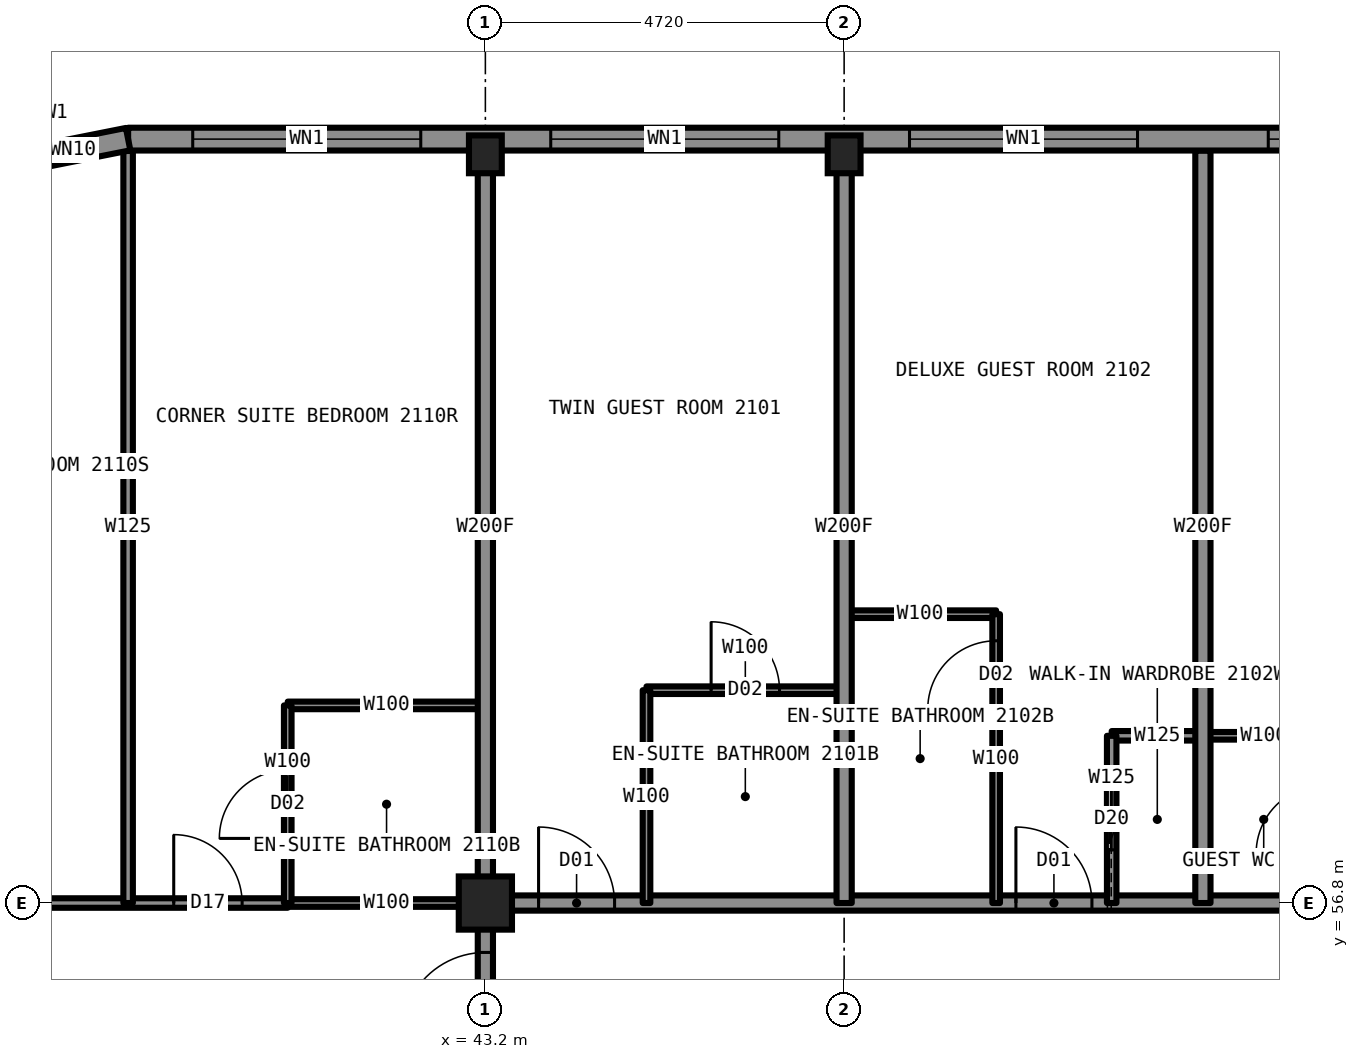
"""IFC4 building model, lengths in metres.
Left out: names, types, materials, properties, quantities, classifications, styles, units other than length and angle.
Written with IfcOpenShell. Run it as: python <this file> out.ifc"""

import sys

from ifc_helpers import new_model, si_unit, direction, frame, frame_2d, origin, origin_2d, place, context, subcontext, project, spatial, rectangle, hollow_rectangle, i_section, extrude, element, fill, save


model = new_model("IFC4")
c1 = context("Model", 3, precision=1e-05, world=origin(), true_north=direction((0.0, 1.0)))
c2 = subcontext(c1, "Body", "Model", "MODEL_VIEW")
j1 = project(units=[si_unit("LENGTHUNIT", "METRE"), si_unit("PLANEANGLEUNIT", "RADIAN")], contexts=[c1])
p1 = place(None, origin())
s1 = spatial("IfcSite", under=j1, at=p1, CompositionType="ELEMENT")
p2 = place(p1, origin())
s2 = spatial("IfcBuilding", under=s1, at=p2, CompositionType="ELEMENT")
p3 = place(p2, frame((0.0, 0.0, 81.0)))
s3 = spatial("IfcBuildingStorey", under=s2, at=p3, CompositionType="ELEMENT", Elevation=81.0)
for number, where, z_axis, x_axis in (
    (1, (43.2, 66.65, 0.0), (0.0, 0.0, 1.0), (1.0, 0.0, 0.0)),
    (2, (47.92, 66.65, 0.0), (0.0, 0.0, 1.0), (1.0, 0.0, 0.0)),
):
    element("IfcColumn", number, at=place(p3, frame(where, z_axis=z_axis, x_axis=x_axis)), inside=s3, PredefinedType="COLUMN", context=c2, shape_type="SweptSolid", body=[
        extrude(i_section(OverallWidth=0.432, OverallDepth=0.498, WebThickness=0.056, FlangeThickness=0.089, at=origin_2d()), origin(), (0.0, 0.0, 1.0), 3.5),
    ])
p4 = place(p3, frame((43.2, 56.8, 0.0), z_axis=(0.0, 0.0, 1.0), x_axis=(1.0, 0.0, 0.0)))
e3 = element("IfcColumn", 3, at=p4, inside=s3, PredefinedType="COLUMN", context=c2, shape_type="SweptSolid", body=[
    extrude(hollow_rectangle(XDim=0.7, YDim=0.7, WallThickness=0.06, at=origin_2d()), origin(), (0.0, 0.0, 1.0), 3.5),
])
p5 = place(p3, frame((40.6, 56.8, 0.0), z_axis=(0.0, 0.0, 1.0), x_axis=(1.0, 0.0, 0.0)))
e4 = element("IfcWall", 4, at=p5, inside=s3, PredefinedType="PARTITIONING", context=c2, shape_type="SweptSolid", body=[
    extrude(rectangle(XDim=2.6, YDim=0.1, at=frame_2d((1.3, 0.0))), origin(), (0.0, 0.0, 1.0), 2.573),
])
p6 = place(p3, frame((43.2, 56.8, 0.0), z_axis=(0.0, 0.0, 1.0), x_axis=(1.0, 0.0, 0.0)))
e5 = element("IfcWall", 5, at=p6, inside=s3, PredefinedType="PARTITIONING", context=c2, shape_type="SweptSolid", body=[
    extrude(rectangle(XDim=23.6, YDim=0.2, at=frame_2d((11.8, 0.0))), origin(), (0.0, 0.0, 1.0), 3.33),
])
p7 = place(p6, frame((0.7, 0.0, 0.0)))
e6 = element("IfcOpeningElement", 6, at=p7, cuts=e5, PredefinedType="OPENING", context=c2, shape_type="SweptSolid", body=[
    extrude(rectangle(XDim=1.0, YDim=2.2, at=frame_2d((0.5, 1.1))), frame((0.0, 0.11, 0.0), z_axis=(0.0, -1.0, 0.0), x_axis=(1.0, 0.0, 0.0)), (0.0, 0.0, 1.0), 0.22),
])
p8 = place(p6, frame((6.98, 0.0, 0.0)))
e7 = element("IfcOpeningElement", 7, at=p8, cuts=e5, PredefinedType="OPENING", context=c2, shape_type="SweptSolid", body=[
    extrude(rectangle(XDim=1.0, YDim=2.2, at=frame_2d((0.5, 1.1))), frame((0.0, 0.11, 0.0), z_axis=(0.0, -1.0, 0.0), x_axis=(1.0, 0.0, 0.0)), (0.0, 0.0, 1.0), 0.22),
])
p9 = place(p6, frame((11.29, 0.0, 0.0)))
e8 = element("IfcOpeningElement", 8, at=p9, cuts=e5, PredefinedType="OPENING", context=c2, shape_type="SweptSolid", body=[
    extrude(rectangle(XDim=1.1, YDim=2.2, at=frame_2d((0.55, 1.1))), frame((0.0, 0.11, 0.0), z_axis=(0.0, -1.0, 0.0), x_axis=(1.0, 0.0, 0.0)), (0.0, 0.0, 1.0), 0.22),
])
p10 = place(p3, frame((33.3, 56.8, 0.0), z_axis=(0.0, 0.0, 1.0), x_axis=(1.0, 0.0, 0.0)))
e9 = element("IfcWall", 9, at=p10, inside=s3, PredefinedType="PARTITIONING", context=c2, shape_type="SweptSolid", body=[
    extrude(rectangle(XDim=7.3, YDim=0.125, at=frame_2d((3.65, 0.0))), origin(), (0.0, 0.0, 1.0), 2.573),
])
p11 = place(p10, frame((5.8, 0.0, 0.0)))
e10 = element("IfcOpeningElement", 10, at=p11, cuts=e9, PredefinedType="OPENING", context=c2, shape_type="SweptSolid", body=[
    extrude(rectangle(XDim=0.9, YDim=2.2, at=frame_2d((0.45, 1.1))), frame((0.0, 0.073, 0.0), z_axis=(0.0, -1.0, 0.0), x_axis=(1.0, 0.0, 0.0)), (0.0, 0.0, 1.0), 0.145),
])
p12 = place(p10, frame((2.0, 0.0, 0.0)))
e11 = element("IfcOpeningElement", 11, at=p12, cuts=e9, PredefinedType="OPENING", context=c2, shape_type="SweptSolid", body=[
    extrude(rectangle(XDim=0.9, YDim=2.2, at=frame_2d((0.45, 1.1))), frame((0.0, 0.073, 0.0), z_axis=(0.0, -1.0, 0.0), x_axis=(1.0, 0.0, 0.0)), (0.0, 0.0, 1.0), 0.145),
])
p13 = place(p3, frame((52.64, 59.0, 0.0), z_axis=(0.0, 0.0, 1.0), x_axis=(1.0, 0.0, 0.0)))
e12 = element("IfcWall", 12, at=p13, inside=s3, PredefinedType="PARTITIONING", context=c2, shape_type="SweptSolid", body=[
    extrude(rectangle(XDim=1.6, YDim=0.1, at=frame_2d((0.8, 0.0))), origin(), (0.0, 0.0, 1.0), 3.33),
])
p14 = place(p3, frame((51.44, 59.0, 0.0), z_axis=(0.0, 0.0, 1.0), x_axis=(1.0, 0.0, 0.0)))
e13 = element("IfcWall", 13, at=p14, inside=s3, PredefinedType="PARTITIONING", context=c2, shape_type="SweptSolid", body=[
    extrude(rectangle(XDim=1.2, YDim=0.125, at=frame_2d((0.6, 0.0))), origin(), (0.0, 0.0, 1.0), 3.33),
])
p15 = place(p3, frame((40.6, 59.4, 0.0), z_axis=(0.0, 0.0, 1.0), x_axis=(1.0, 0.0, 0.0)))
e14 = element("IfcWall", 14, at=p15, inside=s3, PredefinedType="PARTITIONING", context=c2, shape_type="SweptSolid", body=[
    extrude(rectangle(XDim=2.6, YDim=0.1, at=frame_2d((1.3, 0.0))), origin(), (0.0, 0.0, 1.0), 3.33),
])
p16 = place(p3, frame((45.32, 59.6, 0.0), z_axis=(0.0, 0.0, 1.0), x_axis=(1.0, 0.0, 0.0)))
e15 = element("IfcWall", 15, at=p16, inside=s3, PredefinedType="PARTITIONING", context=c2, shape_type="SweptSolid", body=[
    extrude(rectangle(XDim=2.6, YDim=0.1, at=frame_2d((1.3, 0.0))), origin(), (0.0, 0.0, 1.0), 3.33),
])
p17 = place(p16, frame((0.85, 0.0, 0.0)))
e16 = element("IfcOpeningElement", 16, at=p17, cuts=e15, PredefinedType="OPENING", context=c2, shape_type="SweptSolid", body=[
    extrude(rectangle(XDim=0.9, YDim=2.1, at=frame_2d((0.45, 1.05))), frame((0.0, 0.06, 0.0), z_axis=(0.0, -1.0, 0.0), x_axis=(1.0, 0.0, 0.0)), (0.0, 0.0, 1.0), 0.12),
])
p18 = place(p3, frame((47.92, 60.6, 0.0), z_axis=(0.0, 0.0, 1.0), x_axis=(1.0, 0.0, 0.0)))
e17 = element("IfcWall", 17, at=p18, inside=s3, PredefinedType="PARTITIONING", context=c2, shape_type="SweptSolid", body=[
    extrude(rectangle(XDim=2.0, YDim=0.1, at=frame_2d((1.0, 0.0))), origin(), (0.0, 0.0, 1.0), 3.33),
])
p19 = place(p3, frame((43.2, 52.08, 0.0), z_axis=(0.0, 0.0, 1.0), x_axis=(0.0, 1.0, 0.0)))
e18 = element("IfcWall", 18, at=p19, inside=s3, PredefinedType="PARTITIONING", context=c2, shape_type="SweptSolid", body=[
    extrude(rectangle(XDim=4.72, YDim=0.2, at=frame_2d((2.36, 0.0))), origin(), (0.0, 0.0, 1.0), 3.33),
])
p20 = place(p19, frame((2.97, 0.0, 0.0)))
e19 = element("IfcOpeningElement", 19, at=p20, cuts=e18, PredefinedType="OPENING", context=c2, shape_type="SweptSolid", body=[
    extrude(rectangle(XDim=1.1, YDim=2.2, at=frame_2d((0.55, 1.1))), frame((0.0, 0.11, 0.0), z_axis=(0.0, -1.0, 0.0), x_axis=(1.0, 0.0, 0.0)), (0.0, 0.0, 1.0), 0.22),
])
p21 = place(p3, frame((43.2, 56.8, 0.0), z_axis=(0.0, 0.0, 1.0), x_axis=(0.0, 1.0, 0.0)))
e20 = element("IfcWall", 20, at=p21, inside=s3, PredefinedType="PARTITIONING", context=c2, shape_type="SweptSolid", body=[
    extrude(rectangle(XDim=9.9, YDim=0.2, at=frame_2d((4.95, 0.0))), origin(), (0.0, 0.0, 1.0), 2.573),
])
p22 = place(p3, frame((40.6, 56.8, 0.0), z_axis=(0.0, 0.0, 1.0), x_axis=(0.0, 1.0, 0.0)))
e21 = element("IfcWall", 21, at=p22, inside=s3, PredefinedType="PARTITIONING", context=c2, shape_type="SweptSolid", body=[
    extrude(rectangle(XDim=2.6, YDim=0.1, at=frame_2d((1.3, 0.0))), origin(), (0.0, 0.0, 1.0), 3.33),
])
p23 = place(p22, frame((0.85, 0.0, 0.0)))
e22 = element("IfcOpeningElement", 22, at=p23, cuts=e21, PredefinedType="OPENING", context=c2, shape_type="SweptSolid", body=[
    extrude(rectangle(XDim=0.9, YDim=2.1, at=frame_2d((0.45, 1.05))), frame((0.0, 0.06, 0.0), z_axis=(0.0, -1.0, 0.0), x_axis=(1.0, 0.0, 0.0)), (0.0, 0.0, 1.0), 0.12),
])
p24 = place(p3, frame((38.5, 56.8, 0.0), z_axis=(0.0, 0.0, 1.0), x_axis=(0.0, 1.0, 0.0)))
e23 = element("IfcWall", 23, at=p24, inside=s3, PredefinedType="PARTITIONING", context=c2, shape_type="SweptSolid", body=[
    extrude(rectangle(XDim=9.894, YDim=0.125, at=frame_2d((4.947, 0.0))), origin(), (0.0, 0.0, 1.0), 3.33),
])
p25 = place(p3, frame((52.64, 56.8, 0.0), z_axis=(0.0, 0.0, 1.0), x_axis=(0.0, 1.0, 0.0)))
e24 = element("IfcWall", 24, at=p25, inside=s3, PredefinedType="PARTITIONING", context=c2, shape_type="SweptSolid", body=[
    extrude(rectangle(XDim=9.9, YDim=0.2, at=frame_2d((4.95, 0.0))), origin(), (0.0, 0.0, 1.0), 3.33),
])
p26 = place(p3, frame((51.44, 56.8, 0.0), z_axis=(0.0, 0.0, 1.0), x_axis=(0.0, 1.0, 0.0)))
e25 = element("IfcWall", 25, at=p26, inside=s3, PredefinedType="PARTITIONING", context=c2, shape_type="SweptSolid", body=[
    extrude(rectangle(XDim=2.2, YDim=0.125, at=frame_2d((1.1, 0.0))), origin(), (0.0, 0.0, 1.0), 3.33),
])
p27 = place(p26, frame((0.7, 0.0, 0.0)))
e26 = element("IfcOpeningElement", 26, at=p27, cuts=e25, PredefinedType="OPENING", context=c2, shape_type="SweptSolid", body=[
    extrude(rectangle(XDim=0.8, YDim=2.1, at=frame_2d((0.4, 1.05))), frame((0.0, 0.073, 0.0), z_axis=(0.0, -1.0, 0.0), x_axis=(1.0, 0.0, 0.0)), (0.0, 0.0, 1.0), 0.145),
])
p28 = place(p3, frame((49.92, 56.8, 0.0), z_axis=(0.0, 0.0, 1.0), x_axis=(0.0, 1.0, 0.0)))
e27 = element("IfcWall", 27, at=p28, inside=s3, PredefinedType="PARTITIONING", context=c2, shape_type="SweptSolid", body=[
    extrude(rectangle(XDim=3.8, YDim=0.1, at=frame_2d((1.9, 0.0))), origin(), (0.0, 0.0, 1.0), 3.33),
])
p29 = place(p28, frame((2.55, 0.0, 0.0)))
e28 = element("IfcOpeningElement", 28, at=p29, cuts=e27, PredefinedType="OPENING", context=c2, shape_type="SweptSolid", body=[
    extrude(rectangle(XDim=0.9, YDim=2.1, at=frame_2d((0.45, 1.05))), frame((0.0, 0.06, 0.0), z_axis=(0.0, -1.0, 0.0), x_axis=(1.0, 0.0, 0.0)), (0.0, 0.0, 1.0), 0.12),
])
p30 = place(p3, frame((47.92, 56.8, 0.0), z_axis=(0.0, 0.0, 1.0), x_axis=(0.0, 1.0, 0.0)))
e29 = element("IfcWall", 29, at=p30, inside=s3, PredefinedType="PARTITIONING", context=c2, shape_type="SweptSolid", body=[
    extrude(rectangle(XDim=9.9, YDim=0.2, at=frame_2d((4.95, 0.0))), origin(), (0.0, 0.0, 1.0), 2.573),
])
p31 = place(p3, frame((45.32, 56.8, 0.0), z_axis=(0.0, 0.0, 1.0), x_axis=(0.0, 1.0, 0.0)))
e30 = element("IfcWall", 30, at=p31, inside=s3, PredefinedType="PARTITIONING", context=c2, shape_type="SweptSolid", body=[
    extrude(rectangle(XDim=2.8, YDim=0.1, at=frame_2d((1.4, 0.0))), origin(), (0.0, 0.0, 1.0), 3.33),
])
p32 = place(p3, frame((71.5, 66.85, 0.0), z_axis=(0.0, 0.0, 1.0), x_axis=(-1.0, 0.0, 0.0)))
e31 = element("IfcWall", 31, at=p32, inside=s3, PredefinedType="SOLIDWALL", context=c2, shape_type="SweptSolid", body=[
    extrude(rectangle(XDim=33.0, YDim=0.3, at=frame_2d((16.5, 0.0))), origin(), (0.0, 0.0, 1.0), 2.63),
])
p33 = place(p32, frame((0.85, 0.0, 0.5)))
e32 = element("IfcOpeningElement", 32, at=p33, cuts=e31, PredefinedType="OPENING", context=c2, shape_type="SweptSolid", body=[
    extrude(rectangle(XDim=3.0, YDim=2.0, at=frame_2d((1.5, 1.0))), frame((0.0, 0.16, 0.0), z_axis=(0.0, -1.0, 0.0), x_axis=(1.0, 0.0, 0.0)), (0.0, 0.0, 1.0), 0.32),
])
p34 = place(p32, frame((5.56, 0.0, 0.5)))
e33 = element("IfcOpeningElement", 33, at=p34, cuts=e31, PredefinedType="OPENING", context=c2, shape_type="SweptSolid", body=[
    extrude(rectangle(XDim=3.0, YDim=2.0, at=frame_2d((1.5, 1.0))), frame((0.0, 0.16, 0.0), z_axis=(0.0, -1.0, 0.0), x_axis=(1.0, 0.0, 0.0)), (0.0, 0.0, 1.0), 0.32),
])
p35 = place(p32, frame((10.28, 0.0, 0.5)))
e34 = element("IfcOpeningElement", 34, at=p35, cuts=e31, PredefinedType="OPENING", context=c2, shape_type="SweptSolid", body=[
    extrude(rectangle(XDim=3.0, YDim=2.0, at=frame_2d((1.5, 1.0))), frame((0.0, 0.16, 0.0), z_axis=(0.0, -1.0, 0.0), x_axis=(1.0, 0.0, 0.0)), (0.0, 0.0, 1.0), 0.32),
])
p36 = place(p32, frame((15.0, 0.0, 0.5)))
e35 = element("IfcOpeningElement", 35, at=p36, cuts=e31, PredefinedType="OPENING", context=c2, shape_type="SweptSolid", body=[
    extrude(rectangle(XDim=3.0, YDim=2.0, at=frame_2d((1.5, 1.0))), frame((0.0, 0.16, 0.0), z_axis=(0.0, -1.0, 0.0), x_axis=(1.0, 0.0, 0.0)), (0.0, 0.0, 1.0), 0.32),
])
p37 = place(p32, frame((19.72, 0.0, 0.5)))
e36 = element("IfcOpeningElement", 36, at=p37, cuts=e31, PredefinedType="OPENING", context=c2, shape_type="SweptSolid", body=[
    extrude(rectangle(XDim=3.0, YDim=2.0, at=frame_2d((1.5, 1.0))), frame((0.0, 0.16, 0.0), z_axis=(0.0, -1.0, 0.0), x_axis=(1.0, 0.0, 0.0)), (0.0, 0.0, 1.0), 0.32),
])
p38 = place(p32, frame((24.44, 0.0, 0.5)))
e37 = element("IfcOpeningElement", 37, at=p38, cuts=e31, PredefinedType="OPENING", context=c2, shape_type="SweptSolid", body=[
    extrude(rectangle(XDim=3.0, YDim=2.0, at=frame_2d((1.5, 1.0))), frame((0.0, 0.16, 0.0), z_axis=(0.0, -1.0, 0.0), x_axis=(1.0, 0.0, 0.0)), (0.0, 0.0, 1.0), 0.32),
])
p39 = place(p32, frame((29.15, 0.0, 0.5)))
e38 = element("IfcOpeningElement", 38, at=p39, cuts=e31, PredefinedType="OPENING", context=c2, shape_type="SweptSolid", body=[
    extrude(rectangle(XDim=3.0, YDim=2.0, at=frame_2d((1.5, 1.0))), frame((0.0, 0.16, 0.0), z_axis=(0.0, -1.0, 0.0), x_axis=(1.0, 0.0, 0.0)), (0.0, 0.0, 1.0), 0.32),
])
p40 = place(p3, frame((38.5, 66.85, 0.0), z_axis=(0.0, 0.0, 1.0), x_axis=(-0.980787050784, -0.195081421501, 0.0)))
e39 = element("IfcWall", 39, at=p40, inside=s3, PredefinedType="SOLIDWALL", context=c2, shape_type="SweptSolid", body=[
    extrude(rectangle(XDim=2.087, YDim=0.3, at=frame_2d((1.044, 0.0))), origin(), (0.0, 0.0, 1.0), 3.33),
])
p41 = place(p40, frame((0.444, 0.0, 1.65)))
e40 = element("IfcOpeningElement", 40, at=p41, cuts=e39, PredefinedType="OPENING", context=c2, shape_type="SweptSolid", body=[
    extrude(rectangle(XDim=0.6, YDim=0.8, at=frame_2d((0.3, 0.4))), frame((0.0, 0.16, 0.0), z_axis=(0.0, -1.0, 0.0), x_axis=(1.0, 0.0, 0.0)), (0.0, 0.0, 1.0), 0.32),
])
p42 = place(p7, origin())
e41 = element("IfcDoor", 41, at=p42, inside=s3, OperationType="SINGLE_SWING_LEFT", PredefinedType="DOOR", context=c2, shape_type="SweptSolid", body=[
    extrude(rectangle(XDim=1.0, YDim=2.2, at=frame_2d((0.5, 1.1))), frame((0.0, 0.025, 0.0), z_axis=(0.0, -1.0, 0.0), x_axis=(1.0, 0.0, 0.0)), (0.0, 0.0, 1.0), 0.05),
])
fill(e6, e41)
p43 = place(p17, origin())
e42 = element("IfcDoor", 42, at=p43, inside=s3, OperationType="SINGLE_SWING_RIGHT", PredefinedType="DOOR", context=c2, shape_type="SweptSolid", body=[
    extrude(rectangle(XDim=0.9, YDim=2.1, at=frame_2d((0.45, 1.05))), frame((0.0, 0.025, 0.0), z_axis=(0.0, -1.0, 0.0), x_axis=(1.0, 0.0, 0.0)), (0.0, 0.0, 1.0), 0.05),
])
fill(e16, e42)
p44 = place(p8, origin())
e43 = element("IfcDoor", 43, at=p44, inside=s3, OperationType="SINGLE_SWING_LEFT", PredefinedType="DOOR", context=c2, shape_type="SweptSolid", body=[
    extrude(rectangle(XDim=1.0, YDim=2.2, at=frame_2d((0.5, 1.1))), frame((0.0, 0.025, 0.0), z_axis=(0.0, -1.0, 0.0), x_axis=(1.0, 0.0, 0.0)), (0.0, 0.0, 1.0), 0.05),
])
fill(e7, e43)
p45 = place(p29, origin())
e44 = element("IfcDoor", 44, at=p45, inside=s3, OperationType="SINGLE_SWING_RIGHT", PredefinedType="DOOR", context=c2, shape_type="SweptSolid", body=[
    extrude(rectangle(XDim=0.9, YDim=2.1, at=frame_2d((0.45, 1.05))), frame((0.0, 0.025, 0.0), z_axis=(0.0, -1.0, 0.0), x_axis=(1.0, 0.0, 0.0)), (0.0, 0.0, 1.0), 0.05),
])
fill(e28, e44)
p46 = place(p27, origin())
e45 = element("IfcDoor", 45, at=p46, inside=s3, OperationType="SLIDING_TO_LEFT", PredefinedType="DOOR", context=c2, shape_type="SweptSolid", body=[
    extrude(rectangle(XDim=0.8, YDim=2.1, at=frame_2d((0.4, 1.05))), frame((0.0, 0.025, 0.0), z_axis=(0.0, -1.0, 0.0), x_axis=(1.0, 0.0, 0.0)), (0.0, 0.0, 1.0), 0.05),
])
fill(e26, e45)
p47 = place(p20, origin())
e46 = element("IfcDoor", 46, at=p47, inside=s3, OperationType="SINGLE_SWING_LEFT", PredefinedType="DOOR", context=c2, shape_type="SweptSolid", body=[
    extrude(rectangle(XDim=1.1, YDim=2.2, at=frame_2d((0.55, 1.1))), frame((0.0, 0.025, 0.0), z_axis=(0.0, -1.0, 0.0), x_axis=(1.0, 0.0, 0.0)), (0.0, 0.0, 1.0), 0.05),
])
fill(e19, e46)
p48 = place(p23, origin())
e47 = element("IfcDoor", 47, at=p48, inside=s3, OperationType="SINGLE_SWING_RIGHT", PredefinedType="DOOR", context=c2, shape_type="SweptSolid", body=[
    extrude(rectangle(XDim=0.9, YDim=2.1, at=frame_2d((0.45, 1.05))), frame((0.0, 0.025, 0.0), z_axis=(0.0, -1.0, 0.0), x_axis=(1.0, 0.0, 0.0)), (0.0, 0.0, 1.0), 0.05),
])
fill(e22, e47)
p49 = place(p11, origin())
e48 = element("IfcDoor", 48, at=p49, inside=s3, OperationType="SINGLE_SWING_LEFT", PredefinedType="DOOR", context=c2, shape_type="SweptSolid", body=[
    extrude(rectangle(XDim=0.9, YDim=2.2, at=frame_2d((0.45, 1.1))), frame((0.0, 0.025, 0.0), z_axis=(0.0, -1.0, 0.0), x_axis=(1.0, 0.0, 0.0)), (0.0, 0.0, 1.0), 0.05),
])
fill(e10, e48)
p50 = place(p36, origin())
e49 = element("IfcWindow", 49, at=p50, inside=s3, PartitioningType="SINGLE_PANEL", PredefinedType="WINDOW", context=c2, shape_type="SweptSolid", body=[
    extrude(rectangle(XDim=3.0, YDim=2.0, at=frame_2d((1.5, 1.0))), frame((0.0, 0.03, 0.0), z_axis=(0.0, -1.0, 0.0), x_axis=(1.0, 0.0, 0.0)), (0.0, 0.0, 1.0), 0.06),
])
fill(e35, e49)
p51 = place(p37, origin())
e50 = element("IfcWindow", 50, at=p51, inside=s3, PartitioningType="SINGLE_PANEL", PredefinedType="WINDOW", context=c2, shape_type="SweptSolid", body=[
    extrude(rectangle(XDim=3.0, YDim=2.0, at=frame_2d((1.5, 1.0))), frame((0.0, 0.03, 0.0), z_axis=(0.0, -1.0, 0.0), x_axis=(1.0, 0.0, 0.0)), (0.0, 0.0, 1.0), 0.06),
])
fill(e36, e50)
p52 = place(p38, origin())
e51 = element("IfcWindow", 51, at=p52, inside=s3, PartitioningType="SINGLE_PANEL", PredefinedType="WINDOW", context=c2, shape_type="SweptSolid", body=[
    extrude(rectangle(XDim=3.0, YDim=2.0, at=frame_2d((1.5, 1.0))), frame((0.0, 0.03, 0.0), z_axis=(0.0, -1.0, 0.0), x_axis=(1.0, 0.0, 0.0)), (0.0, 0.0, 1.0), 0.06),
])
fill(e37, e51)
p53 = place(p39, origin())
e52 = element("IfcWindow", 52, at=p53, inside=s3, PartitioningType="SINGLE_PANEL", PredefinedType="WINDOW", context=c2, shape_type="SweptSolid", body=[
    extrude(rectangle(XDim=3.0, YDim=2.0, at=frame_2d((1.5, 1.0))), frame((0.0, 0.03, 0.0), z_axis=(0.0, -1.0, 0.0), x_axis=(1.0, 0.0, 0.0)), (0.0, 0.0, 1.0), 0.06),
])
fill(e38, e52)
p54 = place(p41, origin())
e53 = element("IfcWindow", 53, at=p54, inside=s3, PartitioningType="SINGLE_PANEL", PredefinedType="WINDOW", context=c2, shape_type="SweptSolid", body=[
    extrude(rectangle(XDim=0.6, YDim=0.8, at=frame_2d((0.3, 0.4))), frame((0.0, 0.03, 0.0), z_axis=(0.0, -1.0, 0.0), x_axis=(1.0, 0.0, 0.0)), (0.0, 0.0, 1.0), 0.06),
])
fill(e40, e53)
save(model, sys.argv[1])
